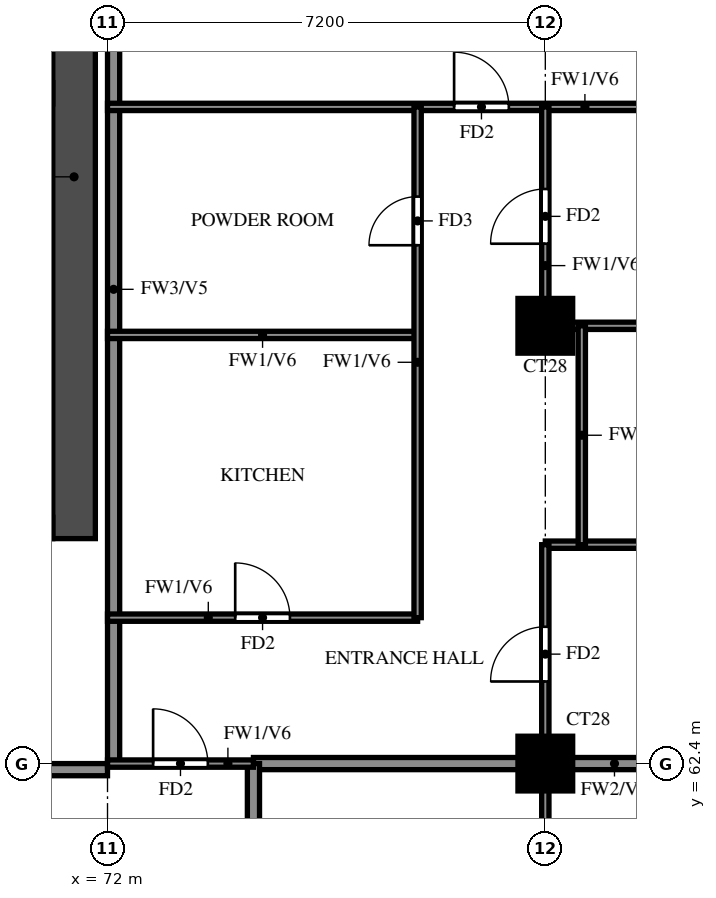
"""IFC4 building model, lengths in metres.
Left out: names, types, materials, properties, quantities, classifications, styles, units other than length and angle.
Written with IfcOpenShell. Run it as: python <this file> out.ifc"""

import sys

from ifc_helpers import new_model, si_unit, direction, frame, frame_2d, origin, origin_2d, place, context, subcontext, project, spatial, rectangle, extrude, source, transform, mapped, element, fill, save


model = new_model("IFC4")
c1 = context("Model", 3, precision=1e-05, world=origin(), true_north=direction((0.0, 1.0)))
c2 = subcontext(c1, "Body", "Model", "MODEL_VIEW")
j1 = project(units=[si_unit("LENGTHUNIT", "METRE"), si_unit("PLANEANGLEUNIT", "RADIAN")], contexts=[c1])
p1 = place(None, origin())
s1 = spatial("IfcSite", under=j1, at=p1, CompositionType="ELEMENT")
p2 = place(p1, origin())
s2 = spatial("IfcBuilding", under=s1, at=p2, CompositionType="ELEMENT")
p3 = place(p2, frame((0.0, 0.0, 202.5)))
s3 = spatial("IfcBuildingStorey", under=s2, at=p3, CompositionType="ELEMENT", Elevation=202.5)
m1 = source(origin(), c2, "Body", "SweptSolid", [
    extrude(rectangle(XDim=0.9, YDim=0.9, at=origin_2d()), origin(), (0.0, 0.0, 1.0), 3.1),
])
for number, where, z_axis, x_axis in (
    (1, (79.2, 62.4, 0.0), (0.0, 0.0, 1.0), (1.0, 0.0, 0.0)),
    (2, (79.2, 69.6, 0.0), (0.0, 0.0, 1.0), (1.0, 0.0, 0.0)),
):
    element("IfcColumn", number, at=place(p3, frame(where, z_axis=z_axis, x_axis=x_axis)), inside=s3, PredefinedType="COLUMN", context=c2, shape_type="MappedRepresentation", body=[
        mapped(m1, transform((0.0, 0.0, 0.0))),
    ])
p4 = place(p3, frame((71.45, 66.1, 0.0), z_axis=(0.0, 0.0, 1.0), x_axis=(0.0, 1.0, 0.0)))
e3 = element("IfcWall", 3, at=p4, inside=s3, PredefinedType="SHEAR", context=c2, shape_type="SweptSolid", body=[
    extrude(rectangle(XDim=11.9, YDim=0.7, at=frame_2d((5.95, 0.0))), origin(), (0.0, 0.0, 1.0), 3.1),
])
p5 = place(p3, frame((29.7, 66.275, 0.0), z_axis=(0.0, 0.0, 1.0), x_axis=(1.0, 0.0, 0.0)))
e4 = element("IfcWall", 4, at=p5, inside=s3, PredefinedType="SHEAR", context=c2, shape_type="SweptSolid", body=[
    extrude(rectangle(XDim=41.4, YDim=0.35, at=frame_2d((20.7, 0.0))), origin(), (0.0, 0.0, 1.0), 3.1),
])
p6 = place(p5, frame((0.925, 0.0, 0.0)))
e5 = element("IfcOpeningElement", 5, at=p6, cuts=e4, PredefinedType="OPENING", context=c2, shape_type="SweptSolid", body=[
    extrude(rectangle(XDim=1.1, YDim=2.1, at=frame_2d((0.55, 1.05))), frame((0.0, 0.185, 0.0), z_axis=(0.0, -1.0, 0.0), x_axis=(1.0, 0.0, 0.0)), (0.0, 0.0, 1.0), 0.37),
])
p7 = place(p5, frame((3.712, 0.0, 0.0)))
e6 = element("IfcOpeningElement", 6, at=p7, cuts=e4, PredefinedType="OPENING", context=c2, shape_type="SweptSolid", body=[
    extrude(rectangle(XDim=1.8, YDim=2.1, at=frame_2d((0.9, 1.05))), frame((0.0, 0.185, 0.0), z_axis=(0.0, -1.0, 0.0), x_axis=(1.0, 0.0, 0.0)), (0.0, 0.0, 1.0), 0.37),
])
p8 = place(p3, frame((67.2, 62.3, 0.0), z_axis=(0.0, 0.0, 1.0), x_axis=(1.0, 0.0, 0.0)))
e7 = element("IfcWall", 7, at=p8, inside=s3, PredefinedType="SOLIDWALL", context=c2, shape_type="SweptSolid", body=[
    extrude(rectangle(XDim=4.8, YDim=0.2, at=frame_2d((2.4, 0.0))), origin(), (0.0, 0.0, 1.0), 3.1),
])
p9 = place(p3, frame((72.1, 62.4, 0.0), z_axis=(0.0, 0.0, 1.0), x_axis=(0.0, 1.0, 0.0)))
e8 = element("IfcWall", 8, at=p9, inside=s3, PredefinedType="SOLIDWALL", context=c2, shape_type="SweptSolid", body=[
    extrude(rectangle(XDim=15.6, YDim=0.2, at=frame_2d((7.8, 0.0))), origin(), (0.0, 0.0, 1.0), 3.1),
])
p10 = place(p3, frame((74.4, 62.4, 0.0), z_axis=(0.0, 0.0, 1.0), x_axis=(1.0, 0.0, 0.0)))
e9 = element("IfcWall", 9, at=p10, inside=s3, PredefinedType="SOLIDWALL", context=c2, shape_type="SweptSolid", body=[
    extrude(rectangle(XDim=11.875, YDim=0.2, at=frame_2d((5.938, 0.0))), origin(), (0.0, 0.0, 1.0), 3.1),
])
p11 = place(p3, frame((74.4, 60.0, 0.0), z_axis=(0.0, 0.0, 1.0), x_axis=(0.0, 1.0, 0.0)))
e10 = element("IfcWall", 10, at=p11, inside=s3, PredefinedType="SOLIDWALL", context=c2, shape_type="SweptSolid", body=[
    extrude(rectangle(XDim=2.4, YDim=0.2, at=frame_2d((1.2, 0.0))), origin(), (0.0, 0.0, 1.0), 3.1),
])
p12 = place(p3, frame((72.0, 62.4, 0.0), z_axis=(0.0, 0.0, 1.0), x_axis=(1.0, 0.0, 0.0)))
e11 = element("IfcWall", 11, at=p12, inside=s3, PredefinedType="PARTITIONING", context=c2, shape_type="SweptSolid", body=[
    extrude(rectangle(XDim=2.4, YDim=0.12, at=frame_2d((1.2, 0.0))), origin(), (0.0, 0.0, 1.0), 3.1),
])
p13 = place(p12, frame((0.75, 0.0, 0.0)))
e12 = element("IfcOpeningElement", 12, at=p13, cuts=e11, PredefinedType="OPENING", context=c2, shape_type="SweptSolid", body=[
    extrude(rectangle(XDim=0.9, YDim=2.1, at=frame_2d((0.45, 1.05))), frame((0.0, 0.07, 0.0), z_axis=(0.0, -1.0, 0.0), x_axis=(1.0, 0.0, 0.0)), (0.0, 0.0, 1.0), 0.14),
])
p14 = place(p3, frame((72.0, 64.8, 0.0), z_axis=(0.0, 0.0, 1.0), x_axis=(1.0, 0.0, 0.0)))
e13 = element("IfcWall", 13, at=p14, inside=s3, PredefinedType="PARTITIONING", context=c2, shape_type="SweptSolid", body=[
    extrude(rectangle(XDim=5.1, YDim=0.12, at=frame_2d((2.55, 0.0))), origin(), (0.0, 0.0, 1.0), 3.1),
])
p15 = place(p14, frame((2.1, 0.0, 0.0)))
e14 = element("IfcOpeningElement", 14, at=p15, cuts=e13, PredefinedType="OPENING", context=c2, shape_type="SweptSolid", body=[
    extrude(rectangle(XDim=0.9, YDim=2.1, at=frame_2d((0.45, 1.05))), frame((0.0, 0.07, 0.0), z_axis=(0.0, -1.0, 0.0), x_axis=(1.0, 0.0, 0.0)), (0.0, 0.0, 1.0), 0.14),
])
p16 = place(p3, frame((79.2, 66.0, 0.0), z_axis=(0.0, 0.0, 1.0), x_axis=(1.0, 0.0, 0.0)))
e15 = element("IfcWall", 15, at=p16, inside=s3, PredefinedType="PARTITIONING", context=c2, shape_type="SweptSolid", body=[
    extrude(rectangle(XDim=7.075, YDim=0.12, at=frame_2d((3.538, 0.0))), origin(), (0.0, 0.0, 1.0), 3.1),
])
p17 = place(p16, frame((3.438, 0.0, 0.0)))
e16 = element("IfcOpeningElement", 16, at=p17, cuts=e15, PredefinedType="OPENING", context=c2, shape_type="SweptSolid", body=[
    extrude(rectangle(XDim=0.8, YDim=2.1, at=frame_2d((0.4, 1.05))), frame((0.0, 0.07, 0.0), z_axis=(0.0, -1.0, 0.0), x_axis=(1.0, 0.0, 0.0)), (0.0, 0.0, 1.0), 0.14),
])
p18 = place(p3, frame((72.0, 69.45, 0.0), z_axis=(0.0, 0.0, 1.0), x_axis=(1.0, 0.0, 0.0)))
e17 = element("IfcWall", 17, at=p18, inside=s3, PredefinedType="PARTITIONING", context=c2, shape_type="SweptSolid", body=[
    extrude(rectangle(XDim=5.1, YDim=0.12, at=frame_2d((2.55, 0.0))), origin(), (0.0, 0.0, 1.0), 3.1),
])
p19 = place(p3, frame((79.2, 69.6, 0.0), z_axis=(0.0, 0.0, 1.0), x_axis=(1.0, 0.0, 0.0)))
e18 = element("IfcWall", 18, at=p19, inside=s3, PredefinedType="PARTITIONING", context=c2, shape_type="SweptSolid", body=[
    extrude(rectangle(XDim=7.075, YDim=0.12, at=frame_2d((3.538, 0.0))), origin(), (0.0, 0.0, 1.0), 3.1),
])
p20 = place(p3, frame((72.0, 73.2, 0.0), z_axis=(0.0, 0.0, 1.0), x_axis=(1.0, 0.0, 0.0)))
e19 = element("IfcWall", 19, at=p20, inside=s3, PredefinedType="PARTITIONING", context=c2, shape_type="SweptSolid", body=[
    extrude(rectangle(XDim=14.275, YDim=0.12, at=frame_2d((7.137, 0.0))), origin(), (0.0, 0.0, 1.0), 3.1),
])
p21 = place(p20, frame((5.7, 0.0, 0.0)))
e20 = element("IfcOpeningElement", 20, at=p21, cuts=e19, PredefinedType="OPENING", context=c2, shape_type="SweptSolid", body=[
    extrude(rectangle(XDim=0.9, YDim=2.1, at=frame_2d((0.45, 1.05))), frame((0.0, 0.07, 0.0), z_axis=(0.0, -1.0, 0.0), x_axis=(1.0, 0.0, 0.0)), (0.0, 0.0, 1.0), 0.14),
])
p22 = place(p3, frame((77.1, 64.8, 0.0), z_axis=(0.0, 0.0, 1.0), x_axis=(0.0, 1.0, 0.0)))
e21 = element("IfcWall", 21, at=p22, inside=s3, PredefinedType="PARTITIONING", context=c2, shape_type="SweptSolid", body=[
    extrude(rectangle(XDim=8.4, YDim=0.12, at=frame_2d((4.2, 0.0))), origin(), (0.0, 0.0, 1.0), 3.1),
])
p23 = place(p22, frame((6.125, 0.0, 0.0)))
e22 = element("IfcOpeningElement", 22, at=p23, cuts=e21, PredefinedType="OPENING", context=c2, shape_type="SweptSolid", body=[
    extrude(rectangle(XDim=0.8, YDim=2.1, at=frame_2d((0.4, 1.05))), frame((0.0, 0.07, 0.0), z_axis=(0.0, -1.0, 0.0), x_axis=(1.0, 0.0, 0.0)), (0.0, 0.0, 1.0), 0.14),
])
p24 = place(p3, frame((79.2, 55.2, 0.0), z_axis=(0.0, 0.0, 1.0), x_axis=(0.0, 1.0, 0.0)))
e23 = element("IfcWall", 23, at=p24, inside=s3, PredefinedType="PARTITIONING", context=c2, shape_type="SweptSolid", body=[
    extrude(rectangle(XDim=10.8, YDim=0.12, at=frame_2d((5.4, 0.0))), origin(), (0.0, 0.0, 1.0), 3.1),
])
p25 = place(p24, frame((2.85, 0.0, 0.0)))
e24 = element("IfcOpeningElement", 24, at=p25, cuts=e23, PredefinedType="OPENING", context=c2, shape_type="SweptSolid", body=[
    extrude(rectangle(XDim=1.5, YDim=2.1, at=frame_2d((0.75, 1.05))), frame((0.0, 0.07, 0.0), z_axis=(0.0, -1.0, 0.0), x_axis=(1.0, 0.0, 0.0)), (0.0, 0.0, 1.0), 0.14),
])
p26 = place(p24, frame((8.55, 0.0, 0.0)))
e25 = element("IfcOpeningElement", 25, at=p26, cuts=e23, PredefinedType="OPENING", context=c2, shape_type="SweptSolid", body=[
    extrude(rectangle(XDim=0.9, YDim=2.1, at=frame_2d((0.45, 1.05))), frame((0.0, 0.07, 0.0), z_axis=(0.0, -1.0, 0.0), x_axis=(1.0, 0.0, 0.0)), (0.0, 0.0, 1.0), 0.14),
])
p27 = place(p3, frame((79.2, 69.6, 0.0), z_axis=(0.0, 0.0, 1.0), x_axis=(0.0, 1.0, 0.0)))
e26 = element("IfcWall", 26, at=p27, inside=s3, PredefinedType="PARTITIONING", context=c2, shape_type="SweptSolid", body=[
    extrude(rectangle(XDim=3.6, YDim=0.12, at=frame_2d((1.8, 0.0))), origin(), (0.0, 0.0, 1.0), 3.1),
])
p28 = place(p27, frame((1.35, 0.0, 0.0)))
e27 = element("IfcOpeningElement", 27, at=p28, cuts=e26, PredefinedType="OPENING", context=c2, shape_type="SweptSolid", body=[
    extrude(rectangle(XDim=0.9, YDim=2.1, at=frame_2d((0.45, 1.05))), frame((0.0, 0.07, 0.0), z_axis=(0.0, -1.0, 0.0), x_axis=(1.0, 0.0, 0.0)), (0.0, 0.0, 1.0), 0.14),
])
p29 = place(p3, frame((79.8, 66.0, 0.0), z_axis=(0.0, 0.0, 1.0), x_axis=(0.0, 1.0, 0.0)))
e28 = element("IfcWall", 28, at=p29, inside=s3, PredefinedType="PARTITIONING", context=c2, shape_type="SweptSolid", body=[
    extrude(rectangle(XDim=3.6, YDim=0.12, at=frame_2d((1.8, 0.0))), origin(), (0.0, 0.0, 1.0), 3.1),
])
p30 = place(p13, origin())
e29 = element("IfcDoor", 29, at=p30, inside=s3, OperationType="SINGLE_SWING_LEFT", PredefinedType="DOOR", context=c2, shape_type="SweptSolid", body=[
    extrude(rectangle(XDim=0.9, YDim=2.1, at=frame_2d((0.45, 1.05))), frame((0.0, 0.025, 0.0), z_axis=(0.0, -1.0, 0.0), x_axis=(1.0, 0.0, 0.0)), (0.0, 0.0, 1.0), 0.05),
])
fill(e12, e29)
p31 = place(p26, origin())
e30 = element("IfcDoor", 30, at=p31, inside=s3, OperationType="SINGLE_SWING_RIGHT", PredefinedType="DOOR", context=c2, shape_type="SweptSolid", body=[
    extrude(rectangle(XDim=0.9, YDim=2.1, at=frame_2d((0.45, 1.05))), frame((0.0, 0.025, 0.0), z_axis=(0.0, -1.0, 0.0), x_axis=(1.0, 0.0, 0.0)), (0.0, 0.0, 1.0), 0.05),
])
fill(e25, e30)
p32 = place(p28, origin())
e31 = element("IfcDoor", 31, at=p32, inside=s3, OperationType="SINGLE_SWING_LEFT", PredefinedType="DOOR", context=c2, shape_type="SweptSolid", body=[
    extrude(rectangle(XDim=0.9, YDim=2.1, at=frame_2d((0.45, 1.05))), frame((0.0, 0.025, 0.0), z_axis=(0.0, -1.0, 0.0), x_axis=(1.0, 0.0, 0.0)), (0.0, 0.0, 1.0), 0.05),
])
fill(e27, e31)
p33 = place(p21, origin())
e32 = element("IfcDoor", 32, at=p33, inside=s3, OperationType="SINGLE_SWING_RIGHT", PredefinedType="DOOR", context=c2, shape_type="SweptSolid", body=[
    extrude(rectangle(XDim=0.9, YDim=2.1, at=frame_2d((0.45, 1.05))), frame((0.0, 0.025, 0.0), z_axis=(0.0, -1.0, 0.0), x_axis=(1.0, 0.0, 0.0)), (0.0, 0.0, 1.0), 0.05),
])
fill(e20, e32)
p34 = place(p15, origin())
e33 = element("IfcDoor", 33, at=p34, inside=s3, OperationType="SINGLE_SWING_LEFT", PredefinedType="DOOR", context=c2, shape_type="SweptSolid", body=[
    extrude(rectangle(XDim=0.9, YDim=2.1, at=frame_2d((0.45, 1.05))), frame((0.0, 0.025, 0.0), z_axis=(0.0, -1.0, 0.0), x_axis=(1.0, 0.0, 0.0)), (0.0, 0.0, 1.0), 0.05),
])
fill(e14, e33)
p35 = place(p23, origin())
e34 = element("IfcDoor", 34, at=p35, inside=s3, OperationType="SINGLE_SWING_LEFT", PredefinedType="DOOR", context=c2, shape_type="SweptSolid", body=[
    extrude(rectangle(XDim=0.8, YDim=2.1, at=frame_2d((0.4, 1.05))), frame((0.0, 0.025, 0.0), z_axis=(0.0, -1.0, 0.0), x_axis=(1.0, 0.0, 0.0)), (0.0, 0.0, 1.0), 0.05),
])
fill(e22, e34)
save(model, sys.argv[1])
